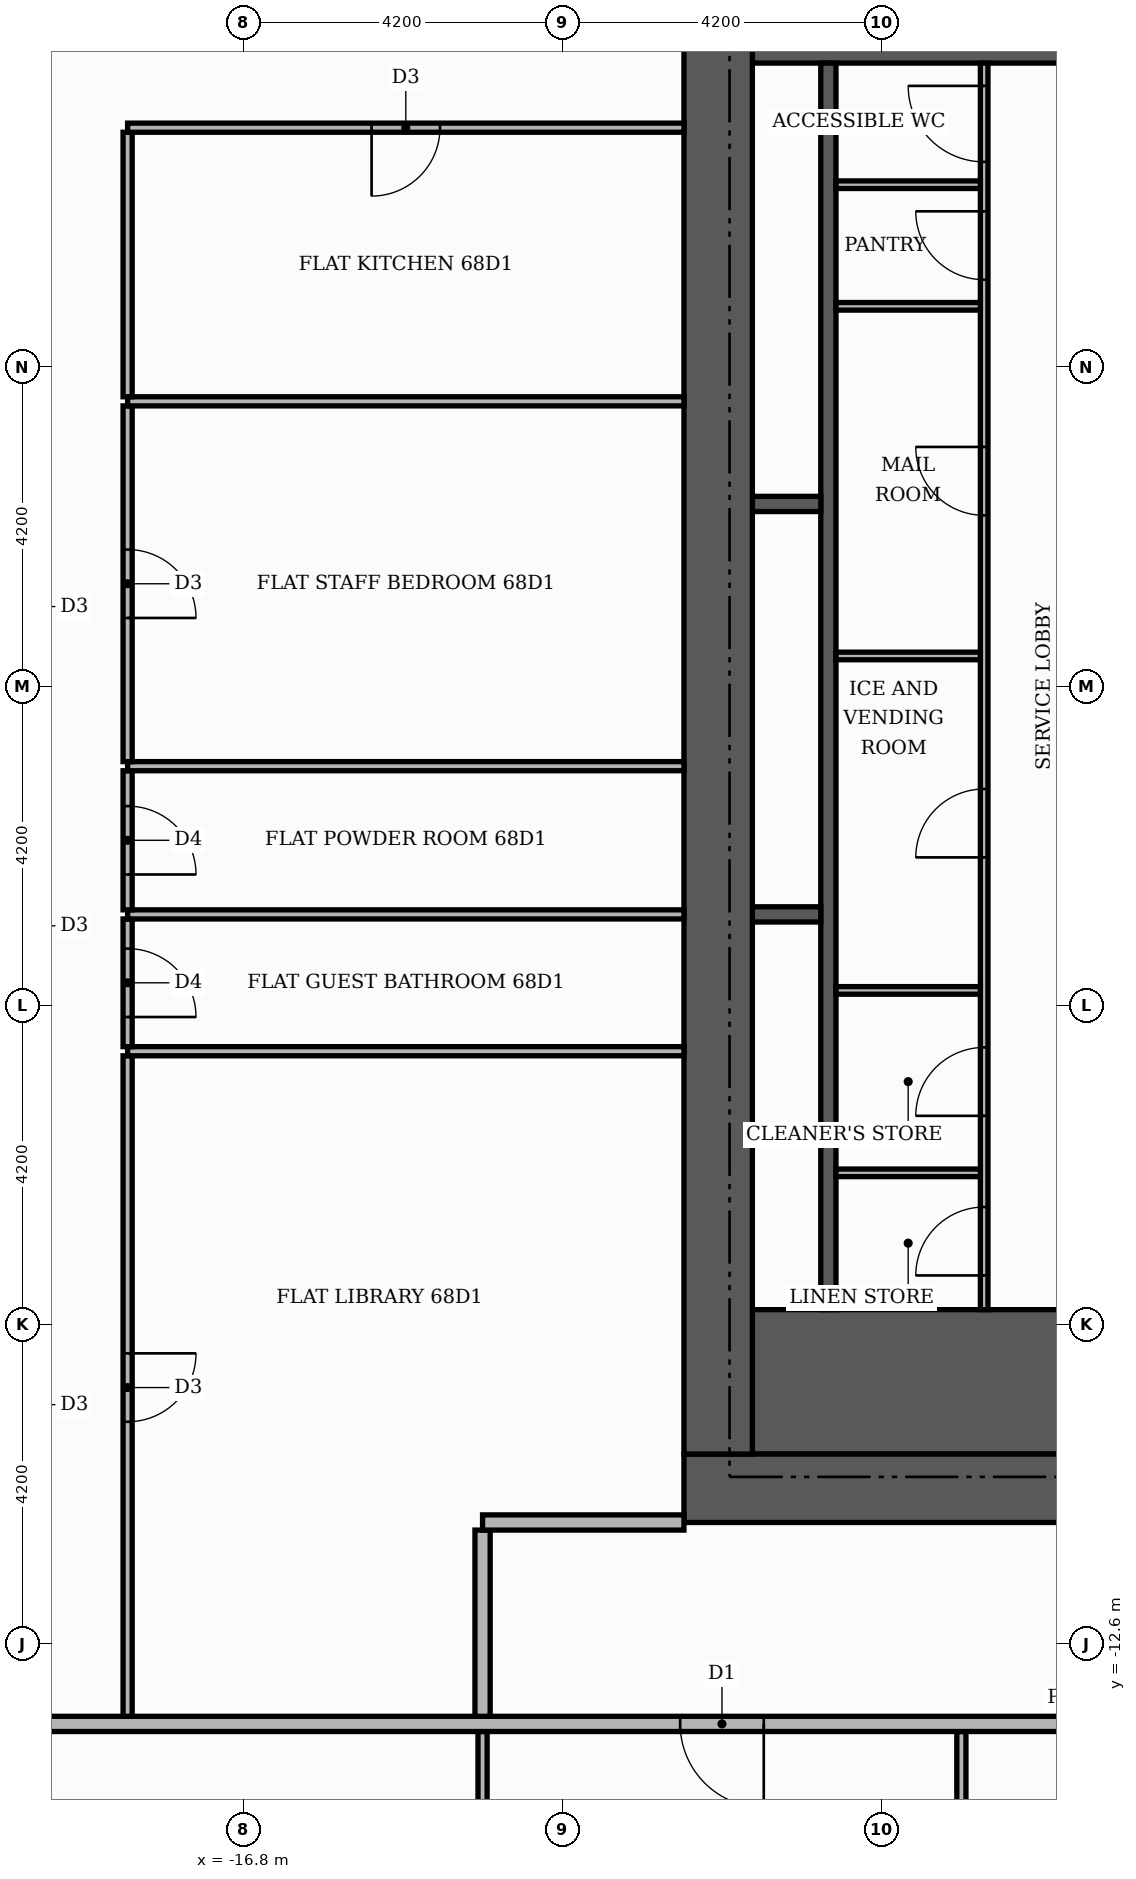
"""IFC4 building model, lengths in metres.
Left out: names, types, materials, properties, quantities, classifications, styles, units other than length and angle.
Written with IfcOpenShell. Run it as: python <this file> out.ifc"""

import sys

from ifc_helpers import new_model, si_unit, direction, frame, frame_2d, origin, place, context, subcontext, project, spatial, rectangle, extrude, element, fill, save


model = new_model("IFC4")
c1 = context("Model", 3, precision=1e-05, world=origin(), true_north=direction((0.0, 1.0)))
c2 = subcontext(c1, "Body", "Model", "MODEL_VIEW")
j1 = project(units=[si_unit("LENGTHUNIT", "METRE"), si_unit("PLANEANGLEUNIT", "RADIAN")], contexts=[c1])
p1 = place(None, origin())
s1 = spatial("IfcSite", under=j1, at=p1, CompositionType="ELEMENT")
p2 = place(p1, origin())
s2 = spatial("IfcBuilding", under=s1, at=p2, CompositionType="ELEMENT")
p3 = place(p2, frame((0.0, 0.0, 283.5)))
s3 = spatial("IfcBuildingStorey", under=s2, at=p3, CompositionType="ELEMENT", Elevation=283.5)
for number, where, z_axis, x_axis in (
    (1, (-10.1, -9.15, 0.0), (0.0, 0.0, 1.0), (1.0, 0.0, 0.0)),
    (2, (-10.1, 9.15, 0.0), (0.0, 0.0, 1.0), (1.0, 0.0, 0.0)),
):
    element("IfcWall", number, at=place(p3, frame(where, z_axis=z_axis, x_axis=x_axis)), inside=s3, PredefinedType="SHEAR", context=c2, shape_type="SweptSolid", body=[
        extrude(rectangle(XDim=4.6, YDim=1.9, at=frame_2d((2.3, 0.0))), origin(), (0.0, 0.0, 1.0), 3.4),
    ])
p4 = place(p3, frame((-9.1, -8.2, 0.0), z_axis=(0.0, 0.0, 1.0), x_axis=(0.0, 1.0, 0.0)))
e3 = element("IfcWall", 3, at=p4, inside=s3, PredefinedType="SHEAR", context=c2, shape_type="SweptSolid", body=[
    extrude(rectangle(XDim=16.4, YDim=0.2, at=frame_2d((8.2, 0.0))), origin(), (0.0, 0.0, 1.0), 3.4),
])
for number, where, z_axis, x_axis in (
    (4, (-10.1, -3.0, 0.0), (0.0, 0.0, 1.0), (1.0, 0.0, 0.0)),
    (5, (-10.1, 2.4, 0.0), (0.0, 0.0, 1.0), (1.0, 0.0, 0.0)),
):
    element("IfcWall", number, at=place(p3, frame(where, z_axis=z_axis, x_axis=x_axis)), inside=s3, PredefinedType="SHEAR", context=c2, shape_type="SweptSolid", body=[
        extrude(rectangle(XDim=0.9, YDim=0.2, at=frame_2d((0.45, 0.0))), origin(), (0.0, 0.0, 1.0), 3.4),
    ])
p5 = place(p3, frame((-11.0, -10.55, 0.0), z_axis=(0.0, 0.0, 1.0), x_axis=(1.0, 0.0, 0.0)))
e6 = element("IfcWall", 6, at=p5, inside=s3, PredefinedType="SHEAR", context=c2, shape_type="SweptSolid", body=[
    extrude(rectangle(XDim=22.0, YDim=0.9, at=frame_2d((11.0, 0.0))), origin(), (0.0, 0.0, 1.0), 3.4),
])
p6 = place(p5, frame((7.4, 0.0, 0.0)))
e7 = element("IfcOpeningElement", 7, at=p6, cuts=e6, PredefinedType="OPENING", context=c2, shape_type="SweptSolid", body=[
    extrude(rectangle(XDim=1.8, YDim=2.2, at=frame_2d((0.9, 1.1))), frame((0.0, 0.46, 0.0), z_axis=(0.0, -1.0, 0.0), x_axis=(1.0, 0.0, 0.0)), (0.0, 0.0, 1.0), 0.92),
])
p7 = place(p3, frame((-10.55, -10.1, 0.0), z_axis=(0.0, 0.0, 1.0), x_axis=(0.0, 1.0, 0.0)))
e8 = element("IfcWall", 8, at=p7, inside=s3, PredefinedType="SHEAR", context=c2, shape_type="SweptSolid", body=[
    extrude(rectangle(XDim=20.2, YDim=0.9, at=frame_2d((10.1, 0.0))), origin(), (0.0, 0.0, 1.0), 3.4),
])
p8 = place(p3, frame((-7.05, -8.2, 0.0), z_axis=(0.0, 0.0, 1.0), x_axis=(0.0, 1.0, 0.0)))
e9 = element("IfcWall", 9, at=p8, inside=s3, PredefinedType="PARTITIONING", context=c2, shape_type="SweptSolid", body=[
    extrude(rectangle(XDim=16.4, YDim=0.1, at=frame_2d((8.2, 0.0))), origin(), (0.0, 0.0, 1.0), 3.4),
])
p9 = place(p8, frame((0.45, 0.0, 0.0)))
e10 = element("IfcOpeningElement", 10, at=p9, cuts=e9, PredefinedType="OPENING", context=c2, shape_type="SweptSolid", body=[
    extrude(rectangle(XDim=0.9, YDim=2.1, at=frame_2d((0.45, 1.05))), frame((0.0, 0.06, 0.0), z_axis=(0.0, -1.0, 0.0), x_axis=(1.0, 0.0, 0.0)), (0.0, 0.0, 1.0), 0.12),
])
p10 = place(p8, frame((2.55, 0.0, 0.0)))
e11 = element("IfcOpeningElement", 11, at=p10, cuts=e9, PredefinedType="OPENING", context=c2, shape_type="SweptSolid", body=[
    extrude(rectangle(XDim=0.9, YDim=2.1, at=frame_2d((0.45, 1.05))), frame((0.0, 0.06, 0.0), z_axis=(0.0, -1.0, 0.0), x_axis=(1.0, 0.0, 0.0)), (0.0, 0.0, 1.0), 0.12),
])
p11 = place(p8, frame((5.95, 0.0, 0.0)))
e12 = element("IfcOpeningElement", 12, at=p11, cuts=e9, PredefinedType="OPENING", context=c2, shape_type="SweptSolid", body=[
    extrude(rectangle(XDim=0.9, YDim=2.1, at=frame_2d((0.45, 1.05))), frame((0.0, 0.06, 0.0), z_axis=(0.0, -1.0, 0.0), x_axis=(1.0, 0.0, 0.0)), (0.0, 0.0, 1.0), 0.12),
])
p12 = place(p8, frame((10.45, 0.0, 0.0)))
e13 = element("IfcOpeningElement", 13, at=p12, cuts=e9, PredefinedType="OPENING", context=c2, shape_type="SweptSolid", body=[
    extrude(rectangle(XDim=0.9, YDim=2.1, at=frame_2d((0.45, 1.05))), frame((0.0, 0.06, 0.0), z_axis=(0.0, -1.0, 0.0), x_axis=(1.0, 0.0, 0.0)), (0.0, 0.0, 1.0), 0.12),
])
p13 = place(p8, frame((13.55, 0.0, 0.0)))
e14 = element("IfcOpeningElement", 14, at=p13, cuts=e9, PredefinedType="OPENING", context=c2, shape_type="SweptSolid", body=[
    extrude(rectangle(XDim=0.9, YDim=2.1, at=frame_2d((0.45, 1.05))), frame((0.0, 0.06, 0.0), z_axis=(0.0, -1.0, 0.0), x_axis=(1.0, 0.0, 0.0)), (0.0, 0.0, 1.0), 0.12),
])
p14 = place(p8, frame((15.1, 0.0, 0.0)))
e15 = element("IfcOpeningElement", 15, at=p14, cuts=e9, PredefinedType="OPENING", context=c2, shape_type="SweptSolid", body=[
    extrude(rectangle(XDim=1.0, YDim=2.1, at=frame_2d((0.5, 1.05))), frame((0.0, 0.06, 0.0), z_axis=(0.0, -1.0, 0.0), x_axis=(1.0, 0.0, 0.0)), (0.0, 0.0, 1.0), 0.12),
])
for number, where, z_axis, x_axis in (
    (16, (-9.0, -6.4, 0.0), (0.0, 0.0, 1.0), (1.0, 0.0, 0.0)),
    (17, (-9.0, -4.0, 0.0), (0.0, 0.0, 1.0), (1.0, 0.0, 0.0)),
    (18, (-9.0, 0.4, 0.0), (0.0, 0.0, 1.0), (1.0, 0.0, 0.0)),
    (19, (-9.0, 5.0, 0.0), (0.0, 0.0, 1.0), (1.0, 0.0, 0.0)),
    (20, (-9.0, 6.6, 0.0), (0.0, 0.0, 1.0), (1.0, 0.0, 0.0)),
):
    element("IfcWall", number, at=place(p3, frame(where, z_axis=z_axis, x_axis=x_axis)), inside=s3, PredefinedType="PARTITIONING", context=c2, shape_type="SweptSolid", body=[
        extrude(rectangle(XDim=1.9, YDim=0.1, at=frame_2d((0.95, 0.0))), origin(), (0.0, 0.0, 1.0), 3.4),
    ])
p15 = place(p3, frame((-13.65, -20.119, 0.0), z_axis=(0.0, 0.0, 1.0), x_axis=(0.0, 1.0, 0.0)))
e21 = element("IfcWall", 21, at=p15, inside=s3, PredefinedType="PARTITIONING", context=c2, shape_type="SweptSolid", body=[
    extrude(rectangle(XDim=6.369, YDim=0.12, at=frame_2d((3.185, 0.0))), origin(), (0.0, 0.0, 1.0), 3.4),
])
p16 = place(p15, frame((2.784, 0.0, 0.0)))
e22 = element("IfcOpeningElement", 22, at=p16, cuts=e21, PredefinedType="OPENING", context=c2, shape_type="SweptSolid", body=[
    extrude(rectangle(XDim=0.9, YDim=2.1, at=frame_2d((0.45, 1.05))), frame((0.0, 0.07, 0.0), z_axis=(0.0, -1.0, 0.0), x_axis=(1.0, 0.0, 0.0)), (0.0, 0.0, 1.0), 0.14),
])
p17 = place(p3, frame((-7.35, -18.56, 0.0), z_axis=(0.0, 0.0, 1.0), x_axis=(0.0, 1.0, 0.0)))
e23 = element("IfcWall", 23, at=p17, inside=s3, PredefinedType="PARTITIONING", context=c2, shape_type="SweptSolid", body=[
    extrude(rectangle(XDim=4.81, YDim=0.12, at=frame_2d((2.405, 0.0))), origin(), (0.0, 0.0, 1.0), 3.4),
])
p18 = place(p3, frame((-25.42, -13.65, 0.0), z_axis=(0.0, 0.0, 1.0), x_axis=(1.0, 0.0, 0.0)))
e24 = element("IfcWall", 24, at=p18, inside=s3, PredefinedType="PARTITIONING", context=c2, shape_type="SweptSolid", body=[
    extrude(rectangle(XDim=39.07, YDim=0.2, at=frame_2d((19.535, 0.0))), origin(), (0.0, 0.0, 1.0), 3.4),
])
p19 = place(p18, frame((14.37, 0.0, 0.0)))
e25 = element("IfcOpeningElement", 25, at=p19, cuts=e24, PredefinedType="OPENING", context=c2, shape_type="SweptSolid", body=[
    extrude(rectangle(XDim=1.1, YDim=2.4, at=frame_2d((0.55, 1.2))), frame((0.0, 0.11, 0.0), z_axis=(0.0, -1.0, 0.0), x_axis=(1.0, 0.0, 0.0)), (0.0, 0.0, 1.0), 0.22),
])
p20 = place(p3, frame((-18.32, -13.55, 0.0), z_axis=(0.0, 0.0, 1.0), x_axis=(0.0, 1.0, 0.0)))
e26 = element("IfcWall", 26, at=p20, inside=s3, PredefinedType="PARTITIONING", context=c2, shape_type="SweptSolid", body=[
    extrude(rectangle(XDim=8.69, YDim=0.12, at=frame_2d((4.345, 0.0))), origin(), (0.0, 0.0, 1.0), 3.4),
])
p21 = place(p20, frame((3.875, 0.0, 0.0)))
e27 = element("IfcOpeningElement", 27, at=p21, cuts=e26, PredefinedType="OPENING", context=c2, shape_type="SweptSolid", body=[
    extrude(rectangle(XDim=0.9, YDim=2.1, at=frame_2d((0.45, 1.05))), frame((0.0, 0.07, 0.0), z_axis=(0.0, -1.0, 0.0), x_axis=(1.0, 0.0, 0.0)), (0.0, 0.0, 1.0), 0.14),
])
p22 = place(p3, frame((-13.65, -13.55, 0.0), z_axis=(0.0, 0.0, 1.0), x_axis=(0.0, 1.0, 0.0)))
e28 = element("IfcWall", 28, at=p22, inside=s3, PredefinedType="PARTITIONING", context=c2, shape_type="SweptSolid", body=[
    extrude(rectangle(XDim=2.45, YDim=0.2, at=frame_2d((1.225, 0.0))), origin(), (0.0, 0.0, 1.0), 3.4),
])
p23 = place(p3, frame((-13.65, -11.0, 0.0), z_axis=(0.0, 0.0, 1.0), x_axis=(1.0, 0.0, 0.0)))
e29 = element("IfcWall", 29, at=p23, inside=s3, PredefinedType="PARTITIONING", context=c2, shape_type="SweptSolid", body=[
    extrude(rectangle(XDim=2.65, YDim=0.2, at=frame_2d((1.325, 0.0))), origin(), (0.0, 0.0, 1.0), 3.4),
])
p24 = place(p3, frame((-18.32, -4.8, 0.0), z_axis=(0.0, 0.0, 1.0), x_axis=(1.0, 0.0, 0.0)))
e30 = element("IfcWall", 30, at=p24, inside=s3, PredefinedType="PARTITIONING", context=c2, shape_type="SweptSolid", body=[
    extrude(rectangle(XDim=7.32, YDim=0.12, at=frame_2d((3.66, 0.0))), origin(), (0.0, 0.0, 1.0), 3.4),
])
p25 = place(p3, frame((-18.32, -4.74, 0.0), z_axis=(0.0, 0.0, 1.0), x_axis=(0.0, 1.0, 0.0)))
e31 = element("IfcWall", 31, at=p25, inside=s3, PredefinedType="PARTITIONING", context=c2, shape_type="SweptSolid", body=[
    extrude(rectangle(XDim=1.68, YDim=0.12, at=frame_2d((0.84, 0.0))), origin(), (0.0, 0.0, 1.0), 3.4),
])
p26 = place(p25, frame((0.39, 0.0, 0.0)))
e32 = element("IfcOpeningElement", 32, at=p26, cuts=e31, PredefinedType="OPENING", context=c2, shape_type="SweptSolid", body=[
    extrude(rectangle(XDim=0.9, YDim=2.1, at=frame_2d((0.45, 1.05))), frame((0.0, 0.07, 0.0), z_axis=(0.0, -1.0, 0.0), x_axis=(1.0, 0.0, 0.0)), (0.0, 0.0, 1.0), 0.14),
])
p27 = place(p3, frame((-18.32, -3.0, 0.0), z_axis=(0.0, 0.0, 1.0), x_axis=(1.0, 0.0, 0.0)))
e33 = element("IfcWall", 33, at=p27, inside=s3, PredefinedType="PARTITIONING", context=c2, shape_type="SweptSolid", body=[
    extrude(rectangle(XDim=7.32, YDim=0.12, at=frame_2d((3.66, 0.0))), origin(), (0.0, 0.0, 1.0), 3.4),
])
p28 = place(p3, frame((-18.32, -2.94, 0.0), z_axis=(0.0, 0.0, 1.0), x_axis=(0.0, 1.0, 0.0)))
e34 = element("IfcWall", 34, at=p28, inside=s3, PredefinedType="PARTITIONING", context=c2, shape_type="SweptSolid", body=[
    extrude(rectangle(XDim=1.83, YDim=0.12, at=frame_2d((0.915, 0.0))), origin(), (0.0, 0.0, 1.0), 3.4),
])
p29 = place(p28, frame((0.465, 0.0, 0.0)))
e35 = element("IfcOpeningElement", 35, at=p29, cuts=e34, PredefinedType="OPENING", context=c2, shape_type="SweptSolid", body=[
    extrude(rectangle(XDim=0.9, YDim=2.1, at=frame_2d((0.45, 1.05))), frame((0.0, 0.07, 0.0), z_axis=(0.0, -1.0, 0.0), x_axis=(1.0, 0.0, 0.0)), (0.0, 0.0, 1.0), 0.14),
])
p30 = place(p3, frame((-18.32, -1.05, 0.0), z_axis=(0.0, 0.0, 1.0), x_axis=(1.0, 0.0, 0.0)))
e36 = element("IfcWall", 36, at=p30, inside=s3, PredefinedType="PARTITIONING", context=c2, shape_type="SweptSolid", body=[
    extrude(rectangle(XDim=7.32, YDim=0.12, at=frame_2d((3.66, 0.0))), origin(), (0.0, 0.0, 1.0), 3.4),
])
p31 = place(p3, frame((-18.32, -0.99, 0.0), z_axis=(0.0, 0.0, 1.0), x_axis=(0.0, 1.0, 0.0)))
e37 = element("IfcWall", 37, at=p31, inside=s3, PredefinedType="PARTITIONING", context=c2, shape_type="SweptSolid", body=[
    extrude(rectangle(XDim=4.68, YDim=0.12, at=frame_2d((2.34, 0.0))), origin(), (0.0, 0.0, 1.0), 3.4),
])
p32 = place(p31, frame((1.89, 0.0, 0.0)))
e38 = element("IfcOpeningElement", 38, at=p32, cuts=e37, PredefinedType="OPENING", context=c2, shape_type="SweptSolid", body=[
    extrude(rectangle(XDim=0.9, YDim=2.1, at=frame_2d((0.45, 1.05))), frame((0.0, 0.07, 0.0), z_axis=(0.0, -1.0, 0.0), x_axis=(1.0, 0.0, 0.0)), (0.0, 0.0, 1.0), 0.14),
])
p33 = place(p3, frame((-18.32, 3.75, 0.0), z_axis=(0.0, 0.0, 1.0), x_axis=(1.0, 0.0, 0.0)))
e39 = element("IfcWall", 39, at=p33, inside=s3, PredefinedType="PARTITIONING", context=c2, shape_type="SweptSolid", body=[
    extrude(rectangle(XDim=7.32, YDim=0.12, at=frame_2d((3.66, 0.0))), origin(), (0.0, 0.0, 1.0), 3.4),
])
p34 = place(p3, frame((-18.32, 3.81, 0.0), z_axis=(0.0, 0.0, 1.0), x_axis=(0.0, 1.0, 0.0)))
e40 = element("IfcWall", 40, at=p34, inside=s3, PredefinedType="PARTITIONING", context=c2, shape_type="SweptSolid", body=[
    extrude(rectangle(XDim=3.48, YDim=0.12, at=frame_2d((1.74, 0.0))), origin(), (0.0, 0.0, 1.0), 3.4),
])
p35 = place(p3, frame((-18.32, 7.35, 0.0), z_axis=(0.0, 0.0, 1.0), x_axis=(1.0, 0.0, 0.0)))
e41 = element("IfcWall", 41, at=p35, inside=s3, PredefinedType="PARTITIONING", context=c2, shape_type="SweptSolid", body=[
    extrude(rectangle(XDim=7.32, YDim=0.12, at=frame_2d((3.66, 0.0))), origin(), (0.0, 0.0, 1.0), 3.4),
])
p36 = place(p35, frame((3.21, 0.0, 0.0)))
e42 = element("IfcOpeningElement", 42, at=p36, cuts=e41, PredefinedType="OPENING", context=c2, shape_type="SweptSolid", body=[
    extrude(rectangle(XDim=0.9, YDim=2.1, at=frame_2d((0.45, 1.05))), frame((0.0, 0.07, 0.0), z_axis=(0.0, -1.0, 0.0), x_axis=(1.0, 0.0, 0.0)), (0.0, 0.0, 1.0), 0.14),
])
p37 = place(p9, origin())
e43 = element("IfcDoor", 43, at=p37, inside=s3, OperationType="SINGLE_SWING_LEFT", PredefinedType="DOOR", context=c2, shape_type="SweptSolid", body=[
    extrude(rectangle(XDim=0.9, YDim=2.1, at=frame_2d((0.45, 1.05))), frame((0.0, 0.025, 0.0), z_axis=(0.0, -1.0, 0.0), x_axis=(1.0, 0.0, 0.0)), (0.0, 0.0, 1.0), 0.05),
])
fill(e10, e43)
p38 = place(p10, origin())
e44 = element("IfcDoor", 44, at=p38, inside=s3, OperationType="SINGLE_SWING_LEFT", PredefinedType="DOOR", context=c2, shape_type="SweptSolid", body=[
    extrude(rectangle(XDim=0.9, YDim=2.1, at=frame_2d((0.45, 1.05))), frame((0.0, 0.025, 0.0), z_axis=(0.0, -1.0, 0.0), x_axis=(1.0, 0.0, 0.0)), (0.0, 0.0, 1.0), 0.05),
])
fill(e11, e44)
p39 = place(p11, origin())
e45 = element("IfcDoor", 45, at=p39, inside=s3, OperationType="SINGLE_SWING_LEFT", PredefinedType="DOOR", context=c2, shape_type="SweptSolid", body=[
    extrude(rectangle(XDim=0.9, YDim=2.1, at=frame_2d((0.45, 1.05))), frame((0.0, 0.025, 0.0), z_axis=(0.0, -1.0, 0.0), x_axis=(1.0, 0.0, 0.0)), (0.0, 0.0, 1.0), 0.05),
])
fill(e12, e45)
p40 = place(p12, origin())
e46 = element("IfcDoor", 46, at=p40, inside=s3, OperationType="SINGLE_SWING_RIGHT", PredefinedType="DOOR", context=c2, shape_type="SweptSolid", body=[
    extrude(rectangle(XDim=0.9, YDim=2.1, at=frame_2d((0.45, 1.05))), frame((0.0, 0.025, 0.0), z_axis=(0.0, -1.0, 0.0), x_axis=(1.0, 0.0, 0.0)), (0.0, 0.0, 1.0), 0.05),
])
fill(e13, e46)
p41 = place(p13, origin())
e47 = element("IfcDoor", 47, at=p41, inside=s3, OperationType="SINGLE_SWING_RIGHT", PredefinedType="DOOR", context=c2, shape_type="SweptSolid", body=[
    extrude(rectangle(XDim=0.9, YDim=2.1, at=frame_2d((0.45, 1.05))), frame((0.0, 0.025, 0.0), z_axis=(0.0, -1.0, 0.0), x_axis=(1.0, 0.0, 0.0)), (0.0, 0.0, 1.0), 0.05),
])
fill(e14, e47)
p42 = place(p14, origin())
e48 = element("IfcDoor", 48, at=p42, inside=s3, OperationType="SINGLE_SWING_RIGHT", PredefinedType="DOOR", context=c2, shape_type="SweptSolid", body=[
    extrude(rectangle(XDim=1.0, YDim=2.1, at=frame_2d((0.5, 1.05))), frame((0.0, 0.025, 0.0), z_axis=(0.0, -1.0, 0.0), x_axis=(1.0, 0.0, 0.0)), (0.0, 0.0, 1.0), 0.05),
])
fill(e15, e48)
p43 = place(p19, frame((1.1, 0.0, 0.0), z_axis=(0.0, 0.0, 1.0), x_axis=(-1.0, 0.0, 0.0)))
e49 = element("IfcDoor", 49, at=p43, inside=s3, OperationType="SINGLE_SWING_RIGHT", PredefinedType="DOOR", context=c2, shape_type="SweptSolid", body=[
    extrude(rectangle(XDim=1.1, YDim=2.4, at=frame_2d((0.55, 1.2))), frame((0.0, 0.025, 0.0), z_axis=(0.0, -1.0, 0.0), x_axis=(1.0, 0.0, 0.0)), (0.0, 0.0, 1.0), 0.05),
])
fill(e25, e49)
p44 = place(p36, frame((0.9, 0.0, 0.0), z_axis=(0.0, 0.0, 1.0), x_axis=(-1.0, 0.0, 0.0)))
e50 = element("IfcDoor", 50, at=p44, inside=s3, OperationType="SINGLE_SWING_LEFT", PredefinedType="DOOR", context=c2, shape_type="SweptSolid", body=[
    extrude(rectangle(XDim=0.9, YDim=2.1, at=frame_2d((0.45, 1.05))), frame((0.0, 0.025, 0.0), z_axis=(0.0, -1.0, 0.0), x_axis=(1.0, 0.0, 0.0)), (0.0, 0.0, 1.0), 0.05),
])
fill(e42, e50)
p45 = place(p32, frame((0.9, 0.0, 0.0), z_axis=(0.0, 0.0, 1.0), x_axis=(-1.0, 0.0, 0.0)))
e51 = element("IfcDoor", 51, at=p45, inside=s3, OperationType="SINGLE_SWING_LEFT", PredefinedType="DOOR", context=c2, shape_type="SweptSolid", body=[
    extrude(rectangle(XDim=0.9, YDim=2.1, at=frame_2d((0.45, 1.05))), frame((0.0, 0.025, 0.0), z_axis=(0.0, -1.0, 0.0), x_axis=(1.0, 0.0, 0.0)), (0.0, 0.0, 1.0), 0.05),
])
fill(e38, e51)
p46 = place(p29, frame((0.9, 0.0, 0.0), z_axis=(0.0, 0.0, 1.0), x_axis=(-1.0, 0.0, 0.0)))
e52 = element("IfcDoor", 52, at=p46, inside=s3, OperationType="SINGLE_SWING_LEFT", PredefinedType="DOOR", context=c2, shape_type="SweptSolid", body=[
    extrude(rectangle(XDim=0.9, YDim=2.1, at=frame_2d((0.45, 1.05))), frame((0.0, 0.025, 0.0), z_axis=(0.0, -1.0, 0.0), x_axis=(1.0, 0.0, 0.0)), (0.0, 0.0, 1.0), 0.05),
])
fill(e35, e52)
p47 = place(p26, frame((0.9, 0.0, 0.0), z_axis=(0.0, 0.0, 1.0), x_axis=(-1.0, 0.0, 0.0)))
e53 = element("IfcDoor", 53, at=p47, inside=s3, OperationType="SINGLE_SWING_LEFT", PredefinedType="DOOR", context=c2, shape_type="SweptSolid", body=[
    extrude(rectangle(XDim=0.9, YDim=2.1, at=frame_2d((0.45, 1.05))), frame((0.0, 0.025, 0.0), z_axis=(0.0, -1.0, 0.0), x_axis=(1.0, 0.0, 0.0)), (0.0, 0.0, 1.0), 0.05),
])
fill(e32, e53)
p48 = place(p21, frame((0.9, 0.0, 0.0), z_axis=(0.0, 0.0, 1.0), x_axis=(-1.0, 0.0, 0.0)))
e54 = element("IfcDoor", 54, at=p48, inside=s3, OperationType="SINGLE_SWING_RIGHT", PredefinedType="DOOR", context=c2, shape_type="SweptSolid", body=[
    extrude(rectangle(XDim=0.9, YDim=2.1, at=frame_2d((0.45, 1.05))), frame((0.0, 0.025, 0.0), z_axis=(0.0, -1.0, 0.0), x_axis=(1.0, 0.0, 0.0)), (0.0, 0.0, 1.0), 0.05),
])
fill(e27, e54)
save(model, sys.argv[1])
